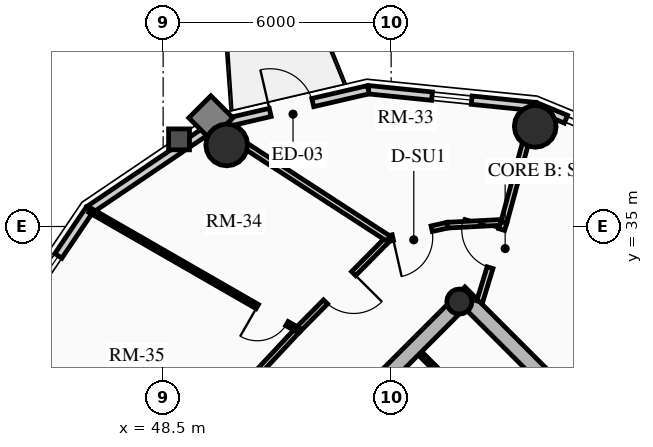
"""IFC4 building model, lengths in metres.
Left out: names, types, materials, properties, quantities, classifications, styles, units other than length and angle.
Written with IfcOpenShell. Run it as: python <this file> out.ifc"""

import sys

from ifc_helpers import new_model, si_unit, direction, frame, frame_2d, origin, origin_2d, place, context, subcontext, project, spatial, rectangle, circle, hollow_circle, extrude, source, transform, mapped, element, fill, save


model = new_model("IFC4")
c1 = context("Model", 3, precision=1e-05, world=origin(), true_north=direction((0.0, 1.0)))
c2 = subcontext(c1, "Body", "Model", "MODEL_VIEW")
j1 = project(units=[si_unit("LENGTHUNIT", "METRE"), si_unit("PLANEANGLEUNIT", "RADIAN")], contexts=[c1])
p1 = place(None, origin())
s1 = spatial("IfcSite", under=j1, at=p1, CompositionType="ELEMENT")
p2 = place(p1, origin())
s2 = spatial("IfcBuilding", under=s1, at=p2, CompositionType="ELEMENT")
p3 = place(p2, frame((0.0, 0.0, 208.3)))
s3 = spatial("IfcBuildingStorey", under=s2, at=p3, CompositionType="ELEMENT", Elevation=208.3)
p4 = place(p3, frame((66.268, 23.298, 0.0), z_axis=(0.0, 0.0, 1.0), x_axis=(-0.707106781187, 0.707106781187, 0.0)))
e1 = element("IfcWall", 1, at=p4, inside=s3, PredefinedType="SHEAR", context=c2, shape_type="SweptSolid", body=[
    extrude(rectangle(XDim=14.1, YDim=0.4, at=frame_2d((7.05, 0.0))), origin(), (0.0, 0.0, 1.0), 2.91),
])
p5 = place(p3, frame((48.873, 25.561, 0.0), z_axis=(0.0, 0.0, 1.0), x_axis=(0.707106781187, 0.707106781187, 0.0)))
e2 = element("IfcWall", 2, at=p5, inside=s3, PredefinedType="SHEAR", context=c2, shape_type="SweptSolid", body=[
    extrude(rectangle(XDim=10.7, YDim=0.4, at=frame_2d((5.35, 0.0))), origin(), (0.0, 0.0, 1.0), 2.91),
])
m1 = source(origin(), c2, "Body", "SweptSolid", [
    extrude(rectangle(XDim=1.5, YDim=2.02, at=frame_2d((0.75, 1.01))), frame((0.0, 0.21, 0.0), z_axis=(0.0, -1.0, 0.0), x_axis=(1.0, 0.0, 0.0)), (0.0, 0.0, 1.0), 0.42),
])
p6 = place(p5, frame((4.6, 0.0, 0.0)))
e3 = element("IfcOpeningElement", 3, at=p6, cuts=e2, PredefinedType="OPENING", context=c2, shape_type="MappedRepresentation", body=[
    mapped(m1, transform((0.0, 0.0, 0.0), x_axis=(1.0, 0.0, 0.0), y_axis=(0.0, 1.0, 0.0), z_axis=(0.0, 0.0, 1.0), scale=1.0)),
])
p7 = place(p3, frame((56.294, 33.024, 0.0), z_axis=(0.0, 0.0, 1.0), x_axis=(0.707106781187, 0.707106781187, 0.0)))
e4 = element("IfcColumn", 4, at=p7, inside=s3, PredefinedType="COLUMN", context=c2, shape_type="SweptSolid", body=[
    extrude(hollow_circle(Radius=0.33, WallThickness=0.025, at=origin_2d()), origin(), (0.0, 0.0, 1.0), 2.91),
])
for number, where, z_axis, x_axis in (
    (5, (58.291, 37.635, 0.0), (0.0, 0.0, 1.0), (1.0, 0.0, 0.0)),
    (6, (50.173, 37.146, 0.0), (0.0, 0.0, 1.0), (1.0, 0.0, 0.0)),
):
    element("IfcColumn", number, at=place(p3, frame(where, z_axis=z_axis, x_axis=x_axis)), inside=s3, PredefinedType="USERDEFINED", context=c2, shape_type="SweptSolid", body=[
        extrude(circle(Radius=0.55, at=origin_2d()), origin(), (0.0, 0.0, 1.0), 2.91),
    ])
p8 = place(p3, frame((58.295, 38.155, 0.0), z_axis=(0.0, 0.0, 1.0), x_axis=(0.924515260676, -0.381145028536, 0.0)))
e7 = element("IfcWall", 7, at=p8, inside=s3, PredefinedType="SOLIDWALL", context=c2, shape_type="SweptSolid", body=[
    extrude(rectangle(XDim=0.87, YDim=0.22, at=frame_2d((0.435, 0.0))), origin(), (0.0, 0.0, 1.0), 2.322),
])
p9 = place(p3, frame((53.9, 38.599, 0.0), z_axis=(0.0, 0.0, 1.0), x_axis=(0.994929930991, -0.100570534541, 0.0)))
e8 = element("IfcWall", 8, at=p9, inside=s3, PredefinedType="SOLIDWALL", context=c2, shape_type="SweptSolid", body=[
    extrude(rectangle(XDim=4.418, YDim=0.22, at=frame_2d((2.209, 0.0))), origin(), (0.0, 0.0, 1.0), 2.322),
])
m2 = source(origin(), c2, "Body", "SweptSolid", [
    extrude(rectangle(XDim=1.05, YDim=1.3, at=frame_2d((0.525, 0.65))), frame((0.0, 0.12, 0.0), z_axis=(0.0, -1.0, 0.0), x_axis=(1.0, 0.0, 0.0)), (0.0, 0.0, 1.0), 0.24),
])
p10 = place(p9, frame((1.684, 0.0, 0.65)))
e9 = element("IfcOpeningElement", 9, at=p10, cuts=e8, PredefinedType="OPENING", context=c2, shape_type="MappedRepresentation", body=[
    mapped(m2, transform((0.0, 0.0, 0.0), x_axis=(1.0, 0.0, 0.0), y_axis=(0.0, 1.0, 0.0), z_axis=(0.0, 0.0, 1.0), scale=1.0)),
])
p11 = place(p3, frame((49.856, 37.663, 0.0), z_axis=(0.0, 0.0, 1.0), x_axis=(0.974249228678, 0.225473813158, 0.0)))
e10 = element("IfcWall", 10, at=p11, inside=s3, PredefinedType="SOLIDWALL", context=c2, shape_type="SweptSolid", body=[
    extrude(rectangle(XDim=4.15, YDim=0.22, at=frame_2d((2.075, 0.0))), origin(), (0.0, 0.0, 1.0), 2.322),
])
m3 = source(origin(), c2, "Body", "SweptSolid", [
    extrude(rectangle(XDim=1.15, YDim=2.005, at=frame_2d((0.575, 1.002))), frame((0.0, 0.12, 0.0), z_axis=(0.0, -1.0, 0.0), x_axis=(1.0, 0.0, 0.0)), (0.0, 0.0, 1.0), 0.24),
])
p12 = place(p11, frame((1.5, 0.0, 0.0)))
e11 = element("IfcOpeningElement", 11, at=p12, cuts=e10, PredefinedType="OPENING", context=c2, shape_type="MappedRepresentation", body=[
    mapped(m3, transform((0.0, 0.0, 0.0), x_axis=(1.0, 0.0, 0.0), y_axis=(0.0, 1.0, 0.0), z_axis=(0.0, 0.0, 1.0), scale=1.0)),
])
p13 = place(p3, frame((46.561, 35.439, 0.0), z_axis=(0.0, 0.0, 1.0), x_axis=(0.828833723692, 0.559495003079, 0.0)))
e12 = element("IfcWall", 12, at=p13, inside=s3, PredefinedType="SOLIDWALL", context=c2, shape_type="SweptSolid", body=[
    extrude(rectangle(XDim=3.976, YDim=0.22, at=frame_2d((1.988, 0.0))), origin(), (0.0, 0.0, 1.0), 2.322),
])
p14 = place(p3, frame((44.337, 32.144, 0.0), z_axis=(0.0, 0.0, 1.0), x_axis=(0.559495003079, 0.828833723692, 0.0)))
e13 = element("IfcWall", 13, at=p14, inside=s3, PredefinedType="SOLIDWALL", context=c2, shape_type="SweptSolid", body=[
    extrude(rectangle(XDim=3.976, YDim=0.22, at=frame_2d((1.988, 0.0))), origin(), (0.0, 0.0, 1.0), 2.322),
])
p15 = place(p14, frame((1.463, 0.0, 0.65)))
e14 = element("IfcOpeningElement", 14, at=p15, cuts=e13, PredefinedType="OPENING", context=c2, shape_type="MappedRepresentation", body=[
    mapped(m2, transform((0.0, 0.0, 0.0), x_axis=(1.0, 0.0, 0.0), y_axis=(0.0, 1.0, 0.0), z_axis=(0.0, 0.0, 1.0), scale=1.0)),
])
p16 = place(p3, frame((57.981, 28.941, 0.0), z_axis=(0.0, 0.0, 1.0), x_axis=(-0.707074823725, 0.707138737204, 0.0)))
e15 = element("IfcWall", 15, at=p16, inside=s3, PredefinedType="PARTITIONING", context=c2, shape_type="SweptSolid", body=[
    extrude(rectangle(XDim=3.82, YDim=0.125, at=frame_2d((1.91, 0.0))), origin(), (0.0, 0.0, 1.0), 2.685),
])
m4 = source(origin(), c2, "Body", "SweptSolid", [
    extrude(rectangle(XDim=0.9, YDim=2.005, at=frame_2d((0.45, 1.002))), frame((0.0, 0.073, 0.0), z_axis=(0.0, -1.0, 0.0), x_axis=(1.0, 0.0, 0.0)), (0.0, 0.0, 1.0), 0.145),
])
p17 = place(p16, frame((1.45, 0.0, 0.0)))
e16 = element("IfcOpeningElement", 16, at=p17, cuts=e15, PredefinedType="OPENING", context=c2, shape_type="MappedRepresentation", body=[
    mapped(m4, transform((0.0, 0.0, 0.0), x_axis=(1.0, 0.0, 0.0), y_axis=(0.0, 1.0, 0.0), z_axis=(0.0, 0.0, 1.0), scale=1.0)),
])
p18 = place(p3, frame((57.467, 35.111, 0.0), z_axis=(0.0, 0.0, 1.0), x_axis=(-0.998691757323, -0.051134859488, 0.0)))
e17 = element("IfcWall", 17, at=p18, inside=s3, PredefinedType="PARTITIONING", context=c2, shape_type="SweptSolid", body=[
    extrude(rectangle(XDim=1.485, YDim=0.15, at=frame_2d((0.742, 0.0))), origin(), (0.0, 0.0, 1.0), 2.322),
])
p19 = place(p3, frame((55.984, 35.035, 0.0), z_axis=(0.0, 0.0, 1.0), x_axis=(-0.975290305708, -0.22092718165, 0.0)))
e18 = element("IfcWall", 18, at=p19, inside=s3, PredefinedType="PARTITIONING", context=c2, shape_type="SweptSolid", body=[
    extrude(rectangle(XDim=1.597, YDim=0.15, at=frame_2d((0.798, 0.0))), origin(), (0.0, 0.0, 1.0), 2.255),
])
m5 = source(origin(), c2, "Body", "SweptSolid", [
    extrude(rectangle(XDim=1.05, YDim=2.015, at=frame_2d((0.525, 1.007))), frame((0.0, 0.085, 0.0), z_axis=(0.0, -1.0, 0.0), x_axis=(1.0, 0.0, 0.0)), (0.0, 0.0, 1.0), 0.17),
])
p20 = place(p19, frame((0.427, 0.0, 0.0)))
e19 = element("IfcOpeningElement", 19, at=p20, cuts=e18, PredefinedType="OPENING", context=c2, shape_type="MappedRepresentation", body=[
    mapped(m5, transform((0.0, 0.0, 0.0), x_axis=(1.0, 0.0, 0.0), y_axis=(0.0, 1.0, 0.0), z_axis=(0.0, 0.0, 1.0), scale=1.0)),
])
p21 = place(p3, frame((54.427, 34.683, 0.0), z_axis=(0.0, 0.0, 1.0), x_axis=(-0.704178989986, -0.710022499687, 0.0)))
e20 = element("IfcWall", 20, at=p21, inside=s3, PredefinedType="PARTITIONING", context=c2, shape_type="SweptSolid", body=[
    extrude(rectangle(XDim=3.384, YDim=0.15, at=frame_2d((1.692, 0.0))), origin(), (0.0, 0.0, 1.0), 2.322),
])
p22 = place(p21, frame((1.298, 0.0, 0.0)))
e21 = element("IfcOpeningElement", 21, at=p22, cuts=e20, PredefinedType="OPENING", context=c2, shape_type="MappedRepresentation", body=[
    mapped(m5, transform((0.0, 0.0, 0.0), x_axis=(1.0, 0.0, 0.0), y_axis=(0.0, 1.0, 0.0), z_axis=(0.0, 0.0, 1.0), scale=1.0)),
])
p23 = place(p3, frame((52.043, 32.28, 0.0), z_axis=(0.0, 0.0, 1.0), x_axis=(-0.682606081633, -0.730786519661, 0.0)))
e22 = element("IfcWall", 22, at=p23, inside=s3, PredefinedType="PARTITIONING", context=c2, shape_type="SweptSolid", body=[
    extrude(rectangle(XDim=6.527, YDim=0.15, at=frame_2d((3.263, 0.0))), origin(), (0.0, 0.0, 1.0), 2.255),
])
p24 = place(p3, frame((57.467, 35.111, 0.0), z_axis=(0.0, 0.0, 1.0), x_axis=(0.263354670488, 0.964699081337, 0.0)))
e23 = element("IfcWall", 23, at=p24, inside=s3, PredefinedType="PARTITIONING", context=c2, shape_type="SweptSolid", body=[
    extrude(rectangle(XDim=3.134, YDim=0.16, at=frame_2d((1.567, 0.0))), origin(), (0.0, 0.0, 1.0), 2.322),
])
p25 = place(p3, frame((54.427, 34.683, 0.0), z_axis=(0.0, 0.0, 1.0), x_axis=(-0.83860663594, 0.544737469023, 0.0)))
e24 = element("IfcWall", 24, at=p25, inside=s3, PredefinedType="PARTITIONING", context=c2, shape_type="SweptSolid", body=[
    extrude(rectangle(XDim=5.439, YDim=0.16, at=frame_2d((2.72, 0.0))), origin(), (0.0, 0.0, 1.0), 2.322),
])
p26 = place(p3, frame((47.588, 27.51, 0.0), z_axis=(0.0, 0.0, 1.0), x_axis=(-0.573073195236, 0.819504187239, 0.0)))
e25 = element("IfcWall", 25, at=p26, inside=s3, PredefinedType="PARTITIONING", context=c2, shape_type="SweptSolid", body=[
    extrude(rectangle(XDim=5.643, YDim=0.16, at=frame_2d((2.822, 0.0))), origin(), (0.0, 0.0, 1.0), 2.322),
])
p27 = place(p3, frame((56.828, 33.021, 0.0), z_axis=(0.0, 0.0, 1.0), x_axis=(0.292139093972, 0.956375841274, 0.0)))
e26 = element("IfcWall", 26, at=p27, inside=s3, PredefinedType="PARTITIONING", context=c2, shape_type="SweptSolid", body=[
    extrude(rectangle(XDim=2.186, YDim=0.16, at=frame_2d((1.093, 0.0))), origin(), (0.0, 0.0, 1.0), 2.255),
])
m6 = source(origin(), c2, "Body", "SweptSolid", [
    extrude(rectangle(XDim=1.05, YDim=2.015, at=frame_2d((0.525, 1.007))), frame((0.0, 0.09, 0.0), z_axis=(0.0, -1.0, 0.0), x_axis=(1.0, 0.0, 0.0)), (0.0, 0.0, 1.0), 0.18),
])
p28 = place(p27, frame((0.936, 0.0, 0.0)))
e27 = element("IfcOpeningElement", 27, at=p28, cuts=e26, PredefinedType="OPENING", context=c2, shape_type="MappedRepresentation", body=[
    mapped(m6, transform((0.0, 0.0, 0.0), x_axis=(1.0, 0.0, 0.0), y_axis=(0.0, 1.0, 0.0), z_axis=(0.0, 0.0, 1.0), scale=1.0)),
])
p29 = place(p3, frame((52.043, 32.28, 0.0), z_axis=(0.0, 0.0, 1.0), x_axis=(-0.866853616581, 0.498562741709, 0.0)))
e28 = element("IfcWall", 28, at=p29, inside=s3, PredefinedType="PARTITIONING", context=c2, shape_type="SweptSolid", body=[
    extrude(rectangle(XDim=6.308, YDim=0.125, at=frame_2d((3.154, 0.0))), origin(), (0.0, 0.0, 1.0), 2.322),
])
p30 = place(p29, frame((0.33, 0.0, 0.0)))
e29 = element("IfcOpeningElement", 29, at=p30, cuts=e28, PredefinedType="OPENING", context=c2, shape_type="MappedRepresentation", body=[
    mapped(m4, transform((0.0, 0.0, 0.0), x_axis=(1.0, 0.0, 0.0), y_axis=(0.0, 1.0, 0.0), z_axis=(0.0, 0.0, 1.0), scale=1.0)),
])
m7 = source(origin(), c2, "Body", "SweptSolid", [
    extrude(rectangle(XDim=1.05, YDim=1.3, at=frame_2d((0.525, 0.65))), frame((0.0, 0.03, 0.0), z_axis=(0.0, -1.0, 0.0), x_axis=(1.0, 0.0, 0.0)), (0.0, 0.0, 1.0), 0.06),
])
p31 = place(p10, origin())
e30 = element("IfcWindow", 30, at=p31, inside=s3, PartitioningType="SINGLE_PANEL", PredefinedType="WINDOW", context=c2, shape_type="MappedRepresentation", body=[
    mapped(m7, transform((0.0, 0.0, 0.0), x_axis=(1.0, 0.0, 0.0), y_axis=(0.0, 1.0, 0.0), z_axis=(0.0, 0.0, 1.0), scale=1.0)),
])
fill(e9, e30)
m8 = source(origin(), c2, "Body", "SweptSolid", [
    extrude(rectangle(XDim=1.15, YDim=2.005, at=frame_2d((0.575, 1.002))), frame((0.0, 0.025, 0.0), z_axis=(0.0, -1.0, 0.0), x_axis=(1.0, 0.0, 0.0)), (0.0, 0.0, 1.0), 0.05),
])
p32 = place(p12, origin())
e31 = element("IfcDoor", 31, at=p32, inside=s3, OperationType="SINGLE_SWING_LEFT", PredefinedType="DOOR", context=c2, shape_type="MappedRepresentation", body=[
    mapped(m8, transform((0.0, 0.0, 0.0), x_axis=(1.0, 0.0, 0.0), y_axis=(0.0, 1.0, 0.0), z_axis=(0.0, 0.0, 1.0), scale=1.0)),
])
fill(e11, e31)
p33 = place(p15, origin())
e32 = element("IfcWindow", 32, at=p33, inside=s3, PartitioningType="SINGLE_PANEL", PredefinedType="WINDOW", context=c2, shape_type="MappedRepresentation", body=[
    mapped(m7, transform((0.0, 0.0, 0.0), x_axis=(1.0, 0.0, 0.0), y_axis=(0.0, 1.0, 0.0), z_axis=(0.0, 0.0, 1.0), scale=1.0)),
])
fill(e14, e32)
m9 = source(origin(), c2, "Body", "SweptSolid", [
    extrude(rectangle(XDim=1.05, YDim=2.015, at=frame_2d((0.525, 1.007))), frame((0.0, 0.025, 0.0), z_axis=(0.0, -1.0, 0.0), x_axis=(1.0, 0.0, 0.0)), (0.0, 0.0, 1.0), 0.05),
])
p34 = place(p28, origin())
e33 = element("IfcDoor", 33, at=p34, inside=s3, OperationType="SINGLE_SWING_RIGHT", PredefinedType="DOOR", context=c2, shape_type="MappedRepresentation", body=[
    mapped(m9, transform((0.0, 0.0, 0.0), x_axis=(1.0, 0.0, 0.0), y_axis=(0.0, 1.0, 0.0), z_axis=(0.0, 0.0, 1.0), scale=1.0)),
])
fill(e27, e33)
p35 = place(p20, origin())
e34 = element("IfcDoor", 34, at=p35, inside=s3, OperationType="SINGLE_SWING_RIGHT", PredefinedType="DOOR", context=c2, shape_type="MappedRepresentation", body=[
    mapped(m9, transform((0.0, 0.0, 0.0), x_axis=(1.0, 0.0, 0.0), y_axis=(0.0, 1.0, 0.0), z_axis=(0.0, 0.0, 1.0), scale=1.0)),
])
fill(e19, e34)
p36 = place(p22, origin())
e35 = element("IfcDoor", 35, at=p36, inside=s3, OperationType="SINGLE_SWING_LEFT", PredefinedType="DOOR", context=c2, shape_type="MappedRepresentation", body=[
    mapped(m9, transform((0.0, 0.0, 0.0), x_axis=(1.0, 0.0, 0.0), y_axis=(0.0, 1.0, 0.0), z_axis=(0.0, 0.0, 1.0), scale=1.0)),
])
fill(e21, e35)
m10 = source(origin(), c2, "Body", "SweptSolid", [
    extrude(rectangle(XDim=0.9, YDim=2.005, at=frame_2d((0.45, 1.002))), frame((0.0, 0.025, 0.0), z_axis=(0.0, -1.0, 0.0), x_axis=(1.0, 0.0, 0.0)), (0.0, 0.0, 1.0), 0.05),
])
p37 = place(p30, origin())
e36 = element("IfcDoor", 36, at=p37, inside=s3, OperationType="SINGLE_SWING_RIGHT", PredefinedType="DOOR", context=c2, shape_type="MappedRepresentation", body=[
    mapped(m10, transform((0.0, 0.0, 0.0), x_axis=(1.0, 0.0, 0.0), y_axis=(0.0, 1.0, 0.0), z_axis=(0.0, 0.0, 1.0), scale=1.0)),
])
fill(e29, e36)
save(model, sys.argv[1])
